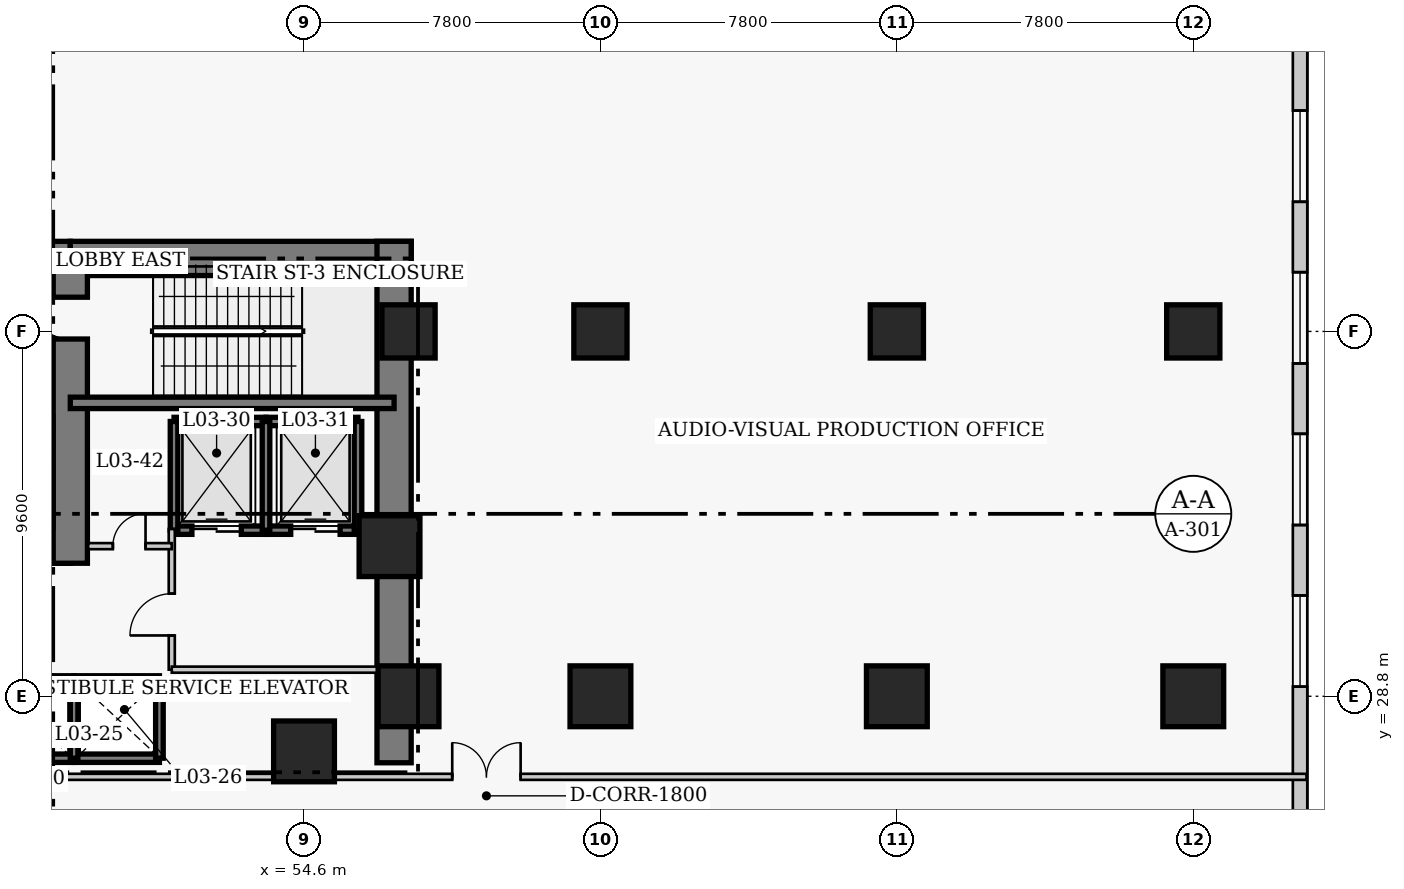
"""IFC4 building model, lengths in metres.
Left out: names, types, materials, properties, quantities, classifications, styles, units other than length and angle.
Written with IfcOpenShell. Run it as: python <this file> out.ifc"""

import sys

from ifc_helpers import new_model, si_unit, direction, frame, frame_2d, origin, origin_2d, place, context, subcontext, project, spatial, rectangle, extrude, element, fill, save


model = new_model("IFC4")
c1 = context("Model", 3, precision=1e-05, world=origin(), true_north=direction((0.0, 1.0)))
c2 = subcontext(c1, "Body", "Model", "MODEL_VIEW")
j1 = project(units=[si_unit("LENGTHUNIT", "METRE"), si_unit("PLANEANGLEUNIT", "RADIAN")], contexts=[c1])
p1 = place(None, origin())
s1 = spatial("IfcSite", under=j1, at=p1, CompositionType="ELEMENT")
p2 = place(p1, origin())
s2 = spatial("IfcBuilding", under=s1, at=p2, CompositionType="ELEMENT")
p3 = place(p2, frame((0.0, 0.0, 15.8)))
s3 = spatial("IfcBuildingStorey", under=s2, at=p3, CompositionType="ELEMENT", Elevation=15.8)
p4 = place(p3, frame((35.85, 40.32, 0.0), z_axis=(0.0, 0.0, 1.0), x_axis=(1.0, 0.0, 0.0)))
e1 = element("IfcWall", 1, at=p4, inside=s3, PredefinedType="SHEAR", context=c2, shape_type="SweptSolid", body=[
    extrude(rectangle(XDim=12.6, YDim=0.9, at=frame_2d((6.3, 0.0))), origin(), (0.0, 0.0, 1.0), 5.0),
])
p5 = place(p3, frame((48.45, 40.32, 0.0), z_axis=(0.0, 0.0, 1.0), x_axis=(1.0, 0.0, 0.0)))
e2 = element("IfcWall", 2, at=p5, inside=s3, PredefinedType="SHEAR", context=c2, shape_type="SweptSolid", body=[
    extrude(rectangle(XDim=8.97, YDim=0.9, at=frame_2d((4.485, 0.0))), origin(), (0.0, 0.0, 1.0), 5.0),
])
p6 = place(p3, frame((56.97, 27.05, 0.0), z_axis=(0.0, 0.0, 1.0), x_axis=(0.0, 1.0, 0.0)))
e3 = element("IfcWall", 3, at=p6, inside=s3, PredefinedType="SHEAR", context=c2, shape_type="SweptSolid", body=[
    extrude(rectangle(XDim=13.72, YDim=0.9, at=frame_2d((6.86, 0.0))), origin(), (0.0, 0.0, 1.0), 5.0),
])
p7 = place(p3, frame((45.81, 32.75, 0.0), z_axis=(0.0, 0.0, 1.0), x_axis=(1.0, 0.0, 0.0)))
e4 = element("IfcWall", 4, at=p7, inside=s3, PredefinedType="SHEAR", context=c2, shape_type="SweptSolid", body=[
    extrude(rectangle(XDim=2.64, YDim=0.9, at=frame_2d((1.32, 0.0))), origin(), (0.0, 0.0, 1.0), 5.0),
])
p8 = place(p3, frame((48.45, 32.3, 0.0), z_axis=(0.0, 0.0, 1.0), x_axis=(0.0, 1.0, 0.0)))
e5 = element("IfcWall", 5, at=p8, inside=s3, PredefinedType="SHEAR", context=c2, shape_type="SweptSolid", body=[
    extrude(rectangle(XDim=8.02, YDim=0.9, at=frame_2d((4.01, 0.0))), origin(), (0.0, 0.0, 1.0), 5.0),
])
p9 = place(p8, frame((5.9, 0.0, 0.0)))
e6 = element("IfcOpeningElement", 6, at=p9, cuts=e5, PredefinedType="OPENING", context=c2, shape_type="SweptSolid", body=[
    extrude(rectangle(XDim=1.1, YDim=2.15, at=frame_2d((0.55, 1.075))), frame((0.0, 0.46, 0.0), z_axis=(0.0, -1.0, 0.0), x_axis=(1.0, 0.0, 0.0)), (0.0, 0.0, 1.0), 0.92),
])
p10 = place(p3, frame((48.45, 36.52, 0.0), z_axis=(0.0, 0.0, 1.0), x_axis=(1.0, 0.0, 0.0)))
e7 = element("IfcWall", 7, at=p10, inside=s3, PredefinedType="SHEAR", context=c2, shape_type="SweptSolid", body=[
    extrude(rectangle(XDim=8.52, YDim=0.3, at=frame_2d((4.26, 0.0))), origin(), (0.0, 0.0, 1.0), 5.0),
])
p11 = place(p3, frame((62.4, 28.8, 0.0), z_axis=(0.0, 0.0, 1.0), x_axis=(1.0, 0.0, 0.0)))
e8 = element("IfcColumn", 8, at=p11, inside=s3, PredefinedType="COLUMN", context=c2, shape_type="SweptSolid", body=[
    extrude(rectangle(XDim=1.6, YDim=1.6, at=origin_2d()), origin(), (0.0, 0.0, 1.0), 5.0),
])
p12 = place(p3, frame((62.4, 38.4, 0.0), z_axis=(0.0, 0.0, 1.0), x_axis=(1.0, 0.0, 0.0)))
e9 = element("IfcColumn", 9, at=p12, inside=s3, PredefinedType="COLUMN", context=c2, shape_type="SweptSolid", body=[
    extrude(rectangle(XDim=1.4, YDim=1.4, at=origin_2d()), origin(), (0.0, 0.0, 1.0), 5.0),
])
p13 = place(p3, frame((70.2, 28.8, 0.0), z_axis=(0.0, 0.0, 1.0), x_axis=(1.0, 0.0, 0.0)))
e10 = element("IfcColumn", 10, at=p13, inside=s3, PredefinedType="COLUMN", context=c2, shape_type="SweptSolid", body=[
    extrude(rectangle(XDim=1.6, YDim=1.6, at=origin_2d()), origin(), (0.0, 0.0, 1.0), 5.0),
])
p14 = place(p3, frame((70.2, 38.4, 0.0), z_axis=(0.0, 0.0, 1.0), x_axis=(1.0, 0.0, 0.0)))
e11 = element("IfcColumn", 11, at=p14, inside=s3, PredefinedType="COLUMN", context=c2, shape_type="SweptSolid", body=[
    extrude(rectangle(XDim=1.4, YDim=1.4, at=origin_2d()), origin(), (0.0, 0.0, 1.0), 5.0),
])
p15 = place(p3, frame((78.0, 28.8, 0.0), z_axis=(0.0, 0.0, 1.0), x_axis=(1.0, 0.0, 0.0)))
e12 = element("IfcColumn", 12, at=p15, inside=s3, PredefinedType="COLUMN", context=c2, shape_type="SweptSolid", body=[
    extrude(rectangle(XDim=1.6, YDim=1.6, at=origin_2d()), origin(), (0.0, 0.0, 1.0), 5.0),
])
p16 = place(p3, frame((78.0, 38.4, 0.0), z_axis=(0.0, 0.0, 1.0), x_axis=(1.0, 0.0, 0.0)))
e13 = element("IfcColumn", 13, at=p16, inside=s3, PredefinedType="COLUMN", context=c2, shape_type="SweptSolid", body=[
    extrude(rectangle(XDim=1.4, YDim=1.4, at=origin_2d()), origin(), (0.0, 0.0, 1.0), 5.0),
])
p17 = place(p3, frame((57.35, 28.8, 0.0), z_axis=(0.0, 0.0, 1.0), x_axis=(1.0, 0.0, 0.0)))
e14 = element("IfcColumn", 14, at=p17, inside=s3, PredefinedType="COLUMN", context=c2, shape_type="SweptSolid", body=[
    extrude(rectangle(XDim=1.6, YDim=1.6, at=origin_2d()), origin(), (0.0, 0.0, 1.0), 5.0),
])
p18 = place(p3, frame((57.35, 38.4, 0.0), z_axis=(0.0, 0.0, 1.0), x_axis=(1.0, 0.0, 0.0)))
e15 = element("IfcColumn", 15, at=p18, inside=s3, PredefinedType="COLUMN", context=c2, shape_type="SweptSolid", body=[
    extrude(rectangle(XDim=1.4, YDim=1.4, at=origin_2d()), origin(), (0.0, 0.0, 1.0), 5.0),
])
for number, where, z_axis, x_axis in (
    (16, (54.6, 27.35, 0.0), (0.0, 0.0, 1.0), (1.0, 0.0, 0.0)),
    (17, (56.85, 32.75, 0.0), (0.0, 0.0, 1.0), (1.0, 0.0, 0.0)),
):
    element("IfcColumn", number, at=place(p3, frame(where, z_axis=z_axis, x_axis=x_axis)), inside=s3, PredefinedType="COLUMN", context=c2, shape_type="SweptSolid", body=[
        extrude(rectangle(XDim=1.6, YDim=1.6, at=origin_2d()), origin(), (0.0, 0.0, 1.0), 5.0),
    ])
p19 = place(p3, frame((80.81, 2.61, 0.0), z_axis=(0.0, 0.0, 1.0), x_axis=(0.0, 1.0, 0.0)))
e18 = element("IfcWall", 18, at=p19, inside=s3, PredefinedType="SOLIDWALL", context=c2, shape_type="SweptSolid", body=[
    extrude(rectangle(XDim=46.78, YDim=0.38, at=frame_2d((23.39, 0.0))), origin(), (0.0, 0.0, 1.0), 4.58),
])
p20 = place(p19, frame((0.927, 0.0, 0.75)))
e19 = element("IfcOpeningElement", 19, at=p20, cuts=e18, PredefinedType="OPENING", context=c2, shape_type="SweptSolid", body=[
    extrude(rectangle(XDim=2.4, YDim=2.2, at=frame_2d((1.2, 1.1))), frame((0.0, 0.2, 0.0), z_axis=(0.0, -1.0, 0.0), x_axis=(1.0, 0.0, 0.0)), (0.0, 0.0, 1.0), 0.4),
])
p21 = place(p19, frame((5.179, 0.0, 0.75)))
e20 = element("IfcOpeningElement", 20, at=p21, cuts=e18, PredefinedType="OPENING", context=c2, shape_type="SweptSolid", body=[
    extrude(rectangle(XDim=2.4, YDim=2.2, at=frame_2d((1.2, 1.1))), frame((0.0, 0.2, 0.0), z_axis=(0.0, -1.0, 0.0), x_axis=(1.0, 0.0, 0.0)), (0.0, 0.0, 1.0), 0.4),
])
p22 = place(p19, frame((9.432, 0.0, 0.75)))
e21 = element("IfcOpeningElement", 21, at=p22, cuts=e18, PredefinedType="OPENING", context=c2, shape_type="SweptSolid", body=[
    extrude(rectangle(XDim=2.4, YDim=2.2, at=frame_2d((1.2, 1.1))), frame((0.0, 0.2, 0.0), z_axis=(0.0, -1.0, 0.0), x_axis=(1.0, 0.0, 0.0)), (0.0, 0.0, 1.0), 0.4),
])
p23 = place(p19, frame((13.034, 0.0, 0.75)))
e22 = element("IfcOpeningElement", 22, at=p23, cuts=e18, PredefinedType="OPENING", context=c2, shape_type="SweptSolid", body=[
    extrude(rectangle(XDim=2.4, YDim=2.2, at=frame_2d((1.2, 1.1))), frame((0.0, 0.2, 0.0), z_axis=(0.0, -1.0, 0.0), x_axis=(1.0, 0.0, 0.0)), (0.0, 0.0, 1.0), 0.4),
])
p24 = place(p19, frame((17.937, 0.0, 0.75)))
e23 = element("IfcOpeningElement", 23, at=p24, cuts=e18, PredefinedType="OPENING", context=c2, shape_type="SweptSolid", body=[
    extrude(rectangle(XDim=2.4, YDim=2.2, at=frame_2d((1.2, 1.1))), frame((0.0, 0.2, 0.0), z_axis=(0.0, -1.0, 0.0), x_axis=(1.0, 0.0, 0.0)), (0.0, 0.0, 1.0), 0.4),
])
p25 = place(p19, frame((26.443, 0.0, 0.75)))
e24 = element("IfcOpeningElement", 24, at=p25, cuts=e18, PredefinedType="OPENING", context=c2, shape_type="SweptSolid", body=[
    extrude(rectangle(XDim=2.4, YDim=2.2, at=frame_2d((1.2, 1.1))), frame((0.0, 0.2, 0.0), z_axis=(0.0, -1.0, 0.0), x_axis=(1.0, 0.0, 0.0)), (0.0, 0.0, 1.0), 0.4),
])
p26 = place(p19, frame((30.696, 0.0, 0.75)))
e25 = element("IfcOpeningElement", 25, at=p26, cuts=e18, PredefinedType="OPENING", context=c2, shape_type="SweptSolid", body=[
    extrude(rectangle(XDim=2.4, YDim=2.2, at=frame_2d((1.2, 1.1))), frame((0.0, 0.2, 0.0), z_axis=(0.0, -1.0, 0.0), x_axis=(1.0, 0.0, 0.0)), (0.0, 0.0, 1.0), 0.4),
])
p27 = place(p19, frame((34.948, 0.0, 0.75)))
e26 = element("IfcOpeningElement", 26, at=p27, cuts=e18, PredefinedType="OPENING", context=c2, shape_type="SweptSolid", body=[
    extrude(rectangle(XDim=2.4, YDim=2.2, at=frame_2d((1.2, 1.1))), frame((0.0, 0.2, 0.0), z_axis=(0.0, -1.0, 0.0), x_axis=(1.0, 0.0, 0.0)), (0.0, 0.0, 1.0), 0.4),
])
p28 = place(p19, frame((39.201, 0.0, 0.75)))
e27 = element("IfcOpeningElement", 27, at=p28, cuts=e18, PredefinedType="OPENING", context=c2, shape_type="SweptSolid", body=[
    extrude(rectangle(XDim=2.4, YDim=2.2, at=frame_2d((1.2, 1.1))), frame((0.0, 0.2, 0.0), z_axis=(0.0, -1.0, 0.0), x_axis=(1.0, 0.0, 0.0)), (0.0, 0.0, 1.0), 0.4),
])
p29 = place(p19, frame((43.454, 0.0, 0.75)))
e28 = element("IfcOpeningElement", 28, at=p29, cuts=e18, PredefinedType="OPENING", context=c2, shape_type="SweptSolid", body=[
    extrude(rectangle(XDim=2.4, YDim=2.2, at=frame_2d((1.2, 1.1))), frame((0.0, 0.2, 0.0), z_axis=(0.0, -1.0, 0.0), x_axis=(1.0, 0.0, 0.0)), (0.0, 0.0, 1.0), 0.4),
])
for number, where, z_axis, x_axis in (
    (29, (46.25, 29.23, 0.0), (0.0, 0.0, 1.0), (1.0, 0.0, 0.0)),
    (30, (46.25, 27.17, 0.0), (0.0, 0.0, 1.0), (1.0, 0.0, 0.0)),
):
    element("IfcWall", number, at=place(p3, frame(where, z_axis=z_axis, x_axis=x_axis)), inside=s3, PredefinedType="SHEAR", context=c2, shape_type="SweptSolid", body=[
        extrude(rectangle(XDim=2.3, YDim=0.22, at=frame_2d((1.15, 0.0))), origin(), (0.0, 0.0, 1.0), 5.0),
    ])
for number, where, z_axis, x_axis in (
    (31, (48.55, 29.23, 0.0), (0.0, 0.0, 1.0), (1.0, 0.0, 0.0)),
    (32, (48.55, 27.17, 0.0), (0.0, 0.0, 1.0), (1.0, 0.0, 0.0)),
):
    element("IfcWall", number, at=place(p3, frame(where, z_axis=z_axis, x_axis=x_axis)), inside=s3, PredefinedType="SHEAR", context=c2, shape_type="SweptSolid", body=[
        extrude(rectangle(XDim=2.245, YDim=0.22, at=frame_2d((1.123, 0.0))), origin(), (0.0, 0.0, 1.0), 5.0),
    ])
for number, where, z_axis, x_axis in (
    (33, (48.55, 27.17, 0.0), (0.0, 0.0, 1.0), (0.0, 1.0, 0.0)),
    (34, (50.795, 27.17, 0.0), (0.0, 0.0, 1.0), (0.0, 1.0, 0.0)),
):
    element("IfcWall", number, at=place(p3, frame(where, z_axis=z_axis, x_axis=x_axis)), inside=s3, PredefinedType="SHEAR", context=c2, shape_type="SweptSolid", body=[
        extrude(rectangle(XDim=2.06, YDim=0.2, at=frame_2d((1.03, 0.0))), origin(), (0.0, 0.0, 1.0), 5.0),
    ])
p30 = place(p3, frame((51.18, 36.03, 0.0), z_axis=(0.0, 0.0, 1.0), x_axis=(1.0, 0.0, 0.0)))
e35 = element("IfcWall", 35, at=p30, inside=s3, PredefinedType="SHEAR", context=c2, shape_type="SweptSolid", body=[
    extrude(rectangle(XDim=2.42, YDim=0.22, at=frame_2d((1.21, 0.0))), origin(), (0.0, 0.0, 1.0), 5.0),
])
p31 = place(p3, frame((51.18, 33.17, 0.0), z_axis=(0.0, 0.0, 1.0), x_axis=(1.0, 0.0, 0.0)))
e36 = element("IfcWall", 36, at=p31, inside=s3, PredefinedType="SHEAR", context=c2, shape_type="SweptSolid", body=[
    extrude(rectangle(XDim=2.42, YDim=0.22, at=frame_2d((1.21, 0.0))), origin(), (0.0, 0.0, 1.0), 5.0),
])
p32 = place(p31, frame((0.47, 0.0, 0.0)))
e37 = element("IfcOpeningElement", 37, at=p32, cuts=e36, PredefinedType="OPENING", context=c2, shape_type="SweptSolid", body=[
    extrude(rectangle(XDim=1.3, YDim=2.15, at=frame_2d((0.65, 1.075))), frame((0.0, 0.12, 0.0), z_axis=(0.0, -1.0, 0.0), x_axis=(1.0, 0.0, 0.0)), (0.0, 0.0, 1.0), 0.24),
])
p33 = place(p3, frame((51.18, 33.17, 0.0), z_axis=(0.0, 0.0, 1.0), x_axis=(0.0, 1.0, 0.0)))
e38 = element("IfcWall", 38, at=p33, inside=s3, PredefinedType="SHEAR", context=c2, shape_type="SweptSolid", body=[
    extrude(rectangle(XDim=2.86, YDim=0.2, at=frame_2d((1.43, 0.0))), origin(), (0.0, 0.0, 1.0), 5.0),
])
p34 = place(p3, frame((53.6, 36.03, 0.0), z_axis=(0.0, 0.0, 1.0), x_axis=(1.0, 0.0, 0.0)))
e39 = element("IfcWall", 39, at=p34, inside=s3, PredefinedType="SHEAR", context=c2, shape_type="SweptSolid", body=[
    extrude(rectangle(XDim=2.42, YDim=0.22, at=frame_2d((1.21, 0.0))), origin(), (0.0, 0.0, 1.0), 5.0),
])
p35 = place(p3, frame((53.6, 33.17, 0.0), z_axis=(0.0, 0.0, 1.0), x_axis=(1.0, 0.0, 0.0)))
e40 = element("IfcWall", 40, at=p35, inside=s3, PredefinedType="SHEAR", context=c2, shape_type="SweptSolid", body=[
    extrude(rectangle(XDim=2.42, YDim=0.22, at=frame_2d((1.21, 0.0))), origin(), (0.0, 0.0, 1.0), 5.0),
])
p36 = place(p35, frame((0.65, 0.0, 0.0)))
e41 = element("IfcOpeningElement", 41, at=p36, cuts=e40, PredefinedType="OPENING", context=c2, shape_type="SweptSolid", body=[
    extrude(rectangle(XDim=1.3, YDim=2.15, at=frame_2d((0.65, 1.075))), frame((0.0, 0.12, 0.0), z_axis=(0.0, -1.0, 0.0), x_axis=(1.0, 0.0, 0.0)), (0.0, 0.0, 1.0), 0.24),
])
for number, where, z_axis, x_axis in (
    (42, (53.6, 33.17, 0.0), (0.0, 0.0, 1.0), (0.0, 1.0, 0.0)),
    (43, (56.02, 33.17, 0.0), (0.0, 0.0, 1.0), (0.0, 1.0, 0.0)),
):
    element("IfcWall", number, at=place(p3, frame(where, z_axis=z_axis, x_axis=x_axis)), inside=s3, PredefinedType="SHEAR", context=c2, shape_type="SweptSolid", body=[
        extrude(rectangle(XDim=2.86, YDim=0.2, at=frame_2d((1.43, 0.0))), origin(), (0.0, 0.0, 1.0), 5.0),
    ])
p37 = place(p3, frame((47.895, 33.245, 0.0), z_axis=(0.0, 0.0, 1.0), x_axis=(0.0, 1.0, 0.0)))
e44 = element("IfcWall", 44, at=p37, inside=s3, PredefinedType="SHEAR", context=c2, shape_type="SweptSolid", body=[
    extrude(rectangle(XDim=2.91, YDim=0.2, at=frame_2d((1.455, 0.0))), origin(), (0.0, 0.0, 1.0), 5.0),
])
p38 = place(p3, frame((51.12, 29.5, 0.0), z_axis=(0.0, 0.0, 1.0), x_axis=(0.0, 1.0, 0.0)))
e45 = element("IfcWall", 45, at=p38, inside=s3, PredefinedType="PARTITIONING", context=c2, shape_type="SweptSolid", body=[
    extrude(rectangle(XDim=3.7, YDim=0.16, at=frame_2d((1.85, 0.0))), origin(), (0.0, 0.0, 1.0), 4.58),
])
p39 = place(p38, frame((0.9, 0.0, 0.0)))
e46 = element("IfcOpeningElement", 46, at=p39, cuts=e45, PredefinedType="OPENING", context=c2, shape_type="SweptSolid", body=[
    extrude(rectangle(XDim=1.1, YDim=2.15, at=frame_2d((0.55, 1.075))), frame((0.0, 0.09, 0.0), z_axis=(0.0, -1.0, 0.0), x_axis=(1.0, 0.0, 0.0)), (0.0, 0.0, 1.0), 0.18),
])
p40 = place(p3, frame((51.12, 29.5, 0.0), z_axis=(0.0, 0.0, 1.0), x_axis=(1.0, 0.0, 0.0)))
e47 = element("IfcWall", 47, at=p40, inside=s3, PredefinedType="PARTITIONING", context=c2, shape_type="SweptSolid", body=[
    extrude(rectangle(XDim=5.63, YDim=0.16, at=frame_2d((2.815, 0.0))), origin(), (0.0, 0.0, 1.0), 4.58),
])
p41 = place(p3, frame((48.92, 32.75, 0.0), z_axis=(0.0, 0.0, 1.0), x_axis=(1.0, 0.0, 0.0)))
e48 = element("IfcWall", 48, at=p41, inside=s3, PredefinedType="PARTITIONING", context=c2, shape_type="SweptSolid", body=[
    extrude(rectangle(XDim=2.2, YDim=0.16, at=frame_2d((1.1, 0.0))), origin(), (0.0, 0.0, 1.0), 4.58),
])
p42 = place(p41, frame((0.65, 0.0, 0.0)))
e49 = element("IfcOpeningElement", 49, at=p42, cuts=e48, PredefinedType="OPENING", context=c2, shape_type="SweptSolid", body=[
    extrude(rectangle(XDim=0.86, YDim=2.05, at=frame_2d((0.43, 1.025))), frame((0.0, 0.09, 0.0), z_axis=(0.0, -1.0, 0.0), x_axis=(1.0, 0.0, 0.0)), (0.0, 0.0, 1.0), 0.18),
])
p43 = place(p3, frame((-2.98, 26.68, 0.0), z_axis=(0.0, 0.0, 1.0), x_axis=(1.0, 0.0, 0.0)))
e50 = element("IfcWall", 50, at=p43, inside=s3, PredefinedType="PARTITIONING", context=c2, shape_type="SweptSolid", body=[
    extrude(rectangle(XDim=83.96, YDim=0.16, at=frame_2d((41.98, 0.0))), origin(), (0.0, 0.0, 1.0), 4.58),
])
p44 = place(p43, frame((41.08, 0.0, 0.0)))
e51 = element("IfcOpeningElement", 51, at=p44, cuts=e50, PredefinedType="OPENING", context=c2, shape_type="SweptSolid", body=[
    extrude(rectangle(XDim=1.8, YDim=2.2, at=frame_2d((0.9, 1.1))), frame((0.0, 0.09, 0.0), z_axis=(0.0, -1.0, 0.0), x_axis=(1.0, 0.0, 0.0)), (0.0, 0.0, 1.0), 0.18),
])
p45 = place(p43, frame((4.042, 0.0, 0.0)))
e52 = element("IfcOpeningElement", 52, at=p45, cuts=e50, PredefinedType="OPENING", context=c2, shape_type="SweptSolid", body=[
    extrude(rectangle(XDim=1.8, YDim=2.2, at=frame_2d((0.9, 1.1))), frame((0.0, 0.09, 0.0), z_axis=(0.0, -1.0, 0.0), x_axis=(1.0, 0.0, 0.0)), (0.0, 0.0, 1.0), 0.18),
])
p46 = place(p43, frame((61.48, 0.0, 0.0)))
e53 = element("IfcOpeningElement", 53, at=p46, cuts=e50, PredefinedType="OPENING", context=c2, shape_type="SweptSolid", body=[
    extrude(rectangle(XDim=1.8, YDim=2.2, at=frame_2d((0.9, 1.1))), frame((0.0, 0.09, 0.0), z_axis=(0.0, -1.0, 0.0), x_axis=(1.0, 0.0, 0.0)), (0.0, 0.0, 1.0), 0.18),
])
p47 = place(p25, origin())
e54 = element("IfcWindow", 54, at=p47, inside=s3, PartitioningType="SINGLE_PANEL", PredefinedType="WINDOW", context=c2, shape_type="SweptSolid", body=[
    extrude(rectangle(XDim=2.4, YDim=2.2, at=frame_2d((1.2, 1.1))), frame((0.0, 0.03, 0.0), z_axis=(0.0, -1.0, 0.0), x_axis=(1.0, 0.0, 0.0)), (0.0, 0.0, 1.0), 0.06),
])
fill(e24, e54)
p48 = place(p26, origin())
e55 = element("IfcWindow", 55, at=p48, inside=s3, PartitioningType="SINGLE_PANEL", PredefinedType="WINDOW", context=c2, shape_type="SweptSolid", body=[
    extrude(rectangle(XDim=2.4, YDim=2.2, at=frame_2d((1.2, 1.1))), frame((0.0, 0.03, 0.0), z_axis=(0.0, -1.0, 0.0), x_axis=(1.0, 0.0, 0.0)), (0.0, 0.0, 1.0), 0.06),
])
fill(e25, e55)
p49 = place(p27, origin())
e56 = element("IfcWindow", 56, at=p49, inside=s3, PartitioningType="SINGLE_PANEL", PredefinedType="WINDOW", context=c2, shape_type="SweptSolid", body=[
    extrude(rectangle(XDim=2.4, YDim=2.2, at=frame_2d((1.2, 1.1))), frame((0.0, 0.03, 0.0), z_axis=(0.0, -1.0, 0.0), x_axis=(1.0, 0.0, 0.0)), (0.0, 0.0, 1.0), 0.06),
])
fill(e26, e56)
p50 = place(p28, origin())
e57 = element("IfcWindow", 57, at=p50, inside=s3, PartitioningType="SINGLE_PANEL", PredefinedType="WINDOW", context=c2, shape_type="SweptSolid", body=[
    extrude(rectangle(XDim=2.4, YDim=2.2, at=frame_2d((1.2, 1.1))), frame((0.0, 0.03, 0.0), z_axis=(0.0, -1.0, 0.0), x_axis=(1.0, 0.0, 0.0)), (0.0, 0.0, 1.0), 0.06),
])
fill(e27, e57)
p51 = place(p32, origin())
e58 = element("IfcDoor", 58, at=p51, inside=s3, OperationType="DOUBLE_DOOR_SLIDING", PredefinedType="DOOR", context=c2, shape_type="SweptSolid", body=[
    extrude(rectangle(XDim=1.3, YDim=2.15, at=frame_2d((0.65, 1.075))), frame((0.0, 0.025, 0.0), z_axis=(0.0, -1.0, 0.0), x_axis=(1.0, 0.0, 0.0)), (0.0, 0.0, 1.0), 0.05),
])
fill(e37, e58)
p52 = place(p36, origin())
e59 = element("IfcDoor", 59, at=p52, inside=s3, OperationType="DOUBLE_DOOR_SLIDING", PredefinedType="DOOR", context=c2, shape_type="SweptSolid", body=[
    extrude(rectangle(XDim=1.3, YDim=2.15, at=frame_2d((0.65, 1.075))), frame((0.0, 0.025, 0.0), z_axis=(0.0, -1.0, 0.0), x_axis=(1.0, 0.0, 0.0)), (0.0, 0.0, 1.0), 0.05),
])
fill(e41, e59)
p53 = place(p39, origin())
e60 = element("IfcDoor", 60, at=p53, inside=s3, OperationType="SINGLE_SWING_LEFT", PredefinedType="DOOR", context=c2, shape_type="SweptSolid", body=[
    extrude(rectangle(XDim=1.1, YDim=2.15, at=frame_2d((0.55, 1.075))), frame((0.0, 0.025, 0.0), z_axis=(0.0, -1.0, 0.0), x_axis=(1.0, 0.0, 0.0)), (0.0, 0.0, 1.0), 0.05),
])
fill(e46, e60)
p54 = place(p42, origin())
e61 = element("IfcDoor", 61, at=p54, inside=s3, OperationType="SINGLE_SWING_RIGHT", PredefinedType="DOOR", context=c2, shape_type="SweptSolid", body=[
    extrude(rectangle(XDim=0.86, YDim=2.05, at=frame_2d((0.43, 1.025))), frame((0.0, 0.025, 0.0), z_axis=(0.0, -1.0, 0.0), x_axis=(1.0, 0.0, 0.0)), (0.0, 0.0, 1.0), 0.05),
])
fill(e49, e61)
p55 = place(p46, origin())
e62 = element("IfcDoor", 62, at=p55, inside=s3, OperationType="DOUBLE_DOOR_SINGLE_SWING", PredefinedType="DOOR", context=c2, shape_type="SweptSolid", body=[
    extrude(rectangle(XDim=1.8, YDim=2.2, at=frame_2d((0.9, 1.1))), frame((0.0, 0.025, 0.0), z_axis=(0.0, -1.0, 0.0), x_axis=(1.0, 0.0, 0.0)), (0.0, 0.0, 1.0), 0.05),
])
fill(e53, e62)
p56 = place(p9, origin())
e63 = element("IfcDoor", 63, at=p56, inside=s3, OperationType="SINGLE_SWING_RIGHT", PredefinedType="DOOR", context=c2, shape_type="SweptSolid", body=[
    extrude(rectangle(XDim=1.1, YDim=2.15, at=frame_2d((0.55, 1.075))), frame((0.0, 0.025, 0.0), z_axis=(0.0, -1.0, 0.0), x_axis=(1.0, 0.0, 0.0)), (0.0, 0.0, 1.0), 0.05),
])
fill(e6, e63)
save(model, sys.argv[1])
